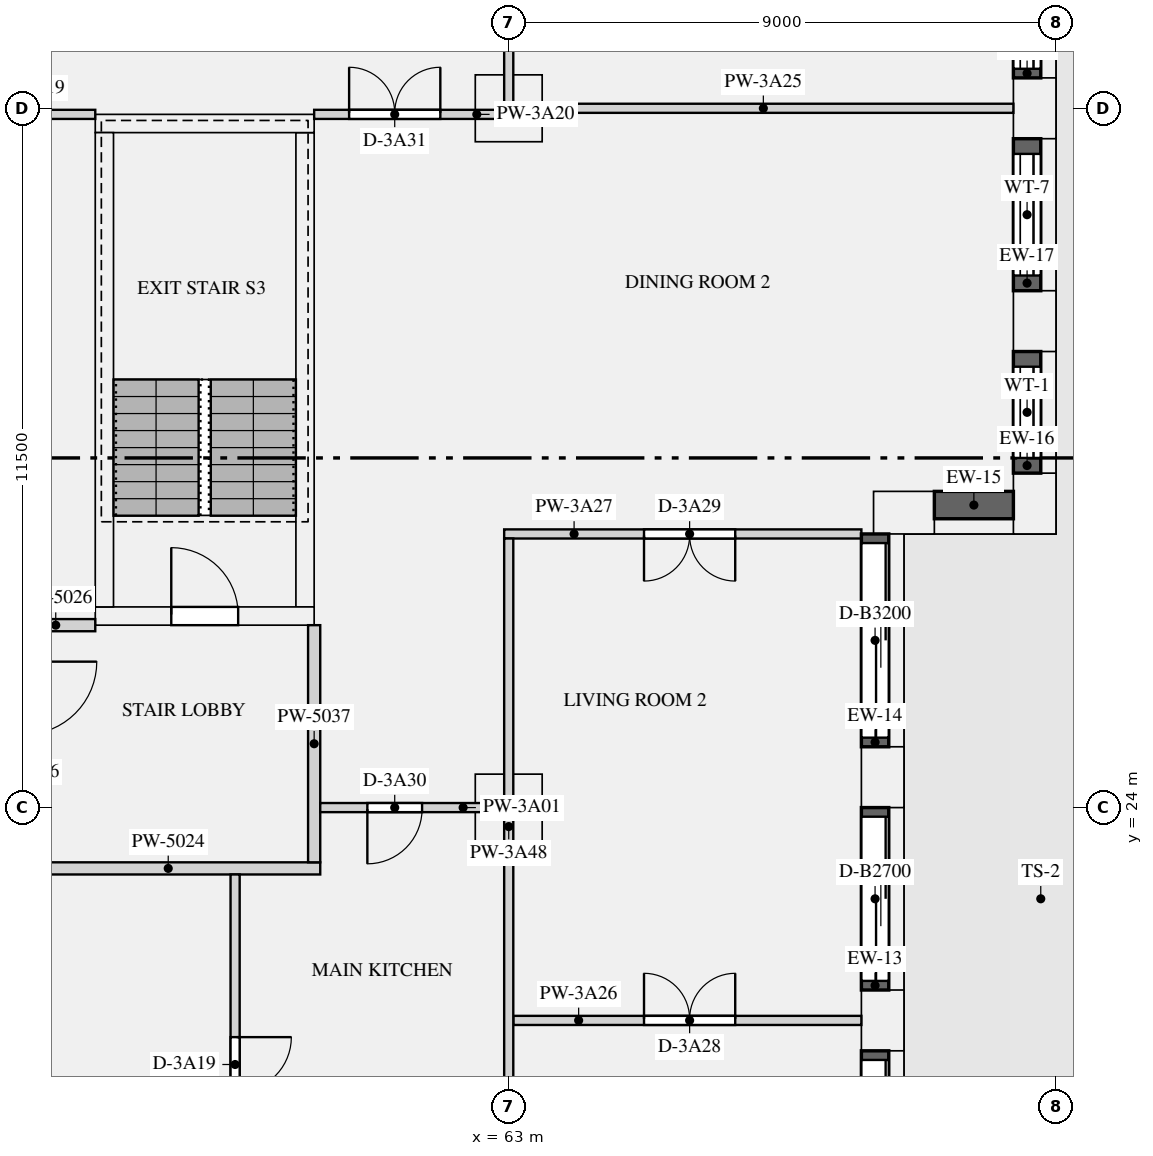
"""IFC4 building model, lengths in metres.
Left out: names, types, materials, properties, quantities, classifications, styles, units other than length and angle.
Written with IfcOpenShell. Run it as: python <this file> out.ifc"""

import sys

from ifc_helpers import new_model, si_unit, direction, frame, frame_2d, origin, origin_2d, place, context, subcontext, project, spatial, rectangle, extrude, element, fill, save


model = new_model("IFC4")
c1 = context("Model", 3, precision=1e-05, world=origin(), true_north=direction((0.0, 1.0)))
c2 = subcontext(c1, "Body", "Model", "MODEL_VIEW")
j1 = project(units=[si_unit("LENGTHUNIT", "METRE"), si_unit("PLANEANGLEUNIT", "RADIAN")], contexts=[c1])
p1 = place(None, origin())
s1 = spatial("IfcSite", under=j1, at=p1, CompositionType="ELEMENT")
p2 = place(p1, origin())
s2 = spatial("IfcBuilding", under=s1, at=p2, CompositionType="ELEMENT")
p3 = place(p2, frame((0.0, 0.0, 141.3)))
s3 = spatial("IfcBuildingStorey", under=s2, at=p3, CompositionType="ELEMENT", Elevation=141.3)
for number, where, z_axis, x_axis in (
    (1, (69.15, 20.5, 0.0), (0.0, 0.0, 1.0), (0.0, 1.0, 0.0)),
    (2, (69.15, 24.5, 0.0), (0.0, 0.0, 1.0), (0.0, 1.0, 0.0)),
    (3, (69.5, 28.85, 0.0), (0.0, 0.0, 1.0), (1.0, 0.0, 0.0)),
    (4, (71.65, 29.0, 0.0), (0.0, 0.0, 1.0), (0.0, 1.0, 0.0)),
    (5, (71.65, 32.0, 0.0), (0.0, 0.0, 1.0), (0.0, 1.0, 0.0)),
    (6, (71.65, 35.5, 0.0), (0.0, 0.0, 1.0), (0.0, 1.0, 0.0)),
):
    element("IfcColumn", number, at=place(p3, frame(where, z_axis=z_axis, x_axis=x_axis)), inside=s3, PredefinedType="USERDEFINED", context=c2, shape_type="SweptSolid", body=[
        extrude(rectangle(XDim=1.0, YDim=0.7, at=origin_2d()), origin(), (0.0, 0.0, 1.0), 3.15),
    ])
for number, where, z_axis, x_axis in (
    (7, (63.0, 24.0, 0.0), (0.0, 0.0, 1.0), (1.0, 0.0, 0.0)),
    (8, (63.0, 35.5, 0.0), (0.0, 0.0, 1.0), (1.0, 0.0, 0.0)),
):
    element("IfcColumn", number, at=place(p3, frame(where, z_axis=z_axis, x_axis=x_axis)), inside=s3, PredefinedType="COLUMN", context=c2, shape_type="SweptSolid", body=[
        extrude(rectangle(XDim=1.1, YDim=1.1, at=origin_2d()), origin(), (0.0, 0.0, 1.0), 3.15),
    ])
p4 = place(p3, frame((56.2, 27.15, 0.0), z_axis=(0.0, 0.0, 1.0), x_axis=(1.0, 0.0, 0.0)))
e9 = element("IfcWall", 9, at=p4, inside=s3, PredefinedType="SHEAR", context=c2, shape_type="SweptSolid", body=[
    extrude(rectangle(XDim=3.6, YDim=0.3, at=frame_2d((1.8, 0.0))), origin(), (0.0, 0.0, 1.0), 3.15),
])
p5 = place(p4, frame((1.25, 0.0, 0.0)))
e10 = element("IfcOpeningElement", 10, at=p5, cuts=e9, PredefinedType="OPENING", context=c2, shape_type="SweptSolid", body=[
    extrude(rectangle(XDim=1.1, YDim=2.1, at=frame_2d((0.55, 1.05))), frame((0.0, 0.16, 0.0), z_axis=(0.0, -1.0, 0.0), x_axis=(1.0, 0.0, 0.0)), (0.0, 0.0, 1.0), 0.32),
])
p6 = place(p3, frame((56.2, 35.25, 0.0), z_axis=(0.0, 0.0, 1.0), x_axis=(1.0, 0.0, 0.0)))
e11 = element("IfcWall", 11, at=p6, inside=s3, PredefinedType="SHEAR", context=c2, shape_type="SweptSolid", body=[
    extrude(rectangle(XDim=3.6, YDim=0.3, at=frame_2d((1.8, 0.0))), origin(), (0.0, 0.0, 1.0), 3.15),
])
for number, where, z_axis, x_axis in (
    (12, (56.35, 27.3, 0.0), (0.0, 0.0, 1.0), (0.0, 1.0, 0.0)),
    (13, (59.65, 27.3, 0.0), (0.0, 0.0, 1.0), (0.0, 1.0, 0.0)),
):
    element("IfcWall", number, at=place(p3, frame(where, z_axis=z_axis, x_axis=x_axis)), inside=s3, PredefinedType="SHEAR", context=c2, shape_type="SweptSolid", body=[
        extrude(rectangle(XDim=7.8, YDim=0.3, at=frame_2d((3.9, 0.0))), origin(), (0.0, 0.0, 1.0), 3.15),
    ])
p7 = place(p3, frame((69.025, 17.0, 0.0), z_axis=(0.0, 0.0, 1.0), x_axis=(0.0, 1.0, 0.0)))
e14 = element("IfcWall", 14, at=p7, inside=s3, PredefinedType="SOLIDWALL", context=c2, shape_type="SweptSolid", body=[
    extrude(rectangle(XDim=3.0, YDim=0.45, at=frame_2d((1.5, 0.0))), origin(), (0.0, 0.0, 1.0), 2.83),
])
p8 = place(p7, frame((0.15, 0.0, 0.0)))
e15 = element("IfcOpeningElement", 15, at=p8, cuts=e14, PredefinedType="OPENING", context=c2, shape_type="SweptSolid", body=[
    extrude(rectangle(XDim=2.7, YDim=2.3, at=frame_2d((1.35, 1.15))), frame((0.0, 0.235, 0.0), z_axis=(0.0, -1.0, 0.0), x_axis=(1.0, 0.0, 0.0)), (0.0, 0.0, 1.0), 0.47),
])
p9 = place(p3, frame((69.025, 21.0, 0.0), z_axis=(0.0, 0.0, 1.0), x_axis=(0.0, 1.0, 0.0)))
e16 = element("IfcWall", 16, at=p9, inside=s3, PredefinedType="SOLIDWALL", context=c2, shape_type="SweptSolid", body=[
    extrude(rectangle(XDim=3.0, YDim=0.45, at=frame_2d((1.5, 0.0))), origin(), (0.0, 0.0, 1.0), 2.83),
])
p10 = place(p9, frame((0.15, 0.0, 0.0)))
e17 = element("IfcOpeningElement", 17, at=p10, cuts=e16, PredefinedType="OPENING", context=c2, shape_type="SweptSolid", body=[
    extrude(rectangle(XDim=2.7, YDim=2.3, at=frame_2d((1.35, 1.15))), frame((0.0, 0.235, 0.0), z_axis=(0.0, -1.0, 0.0), x_axis=(1.0, 0.0, 0.0)), (0.0, 0.0, 1.0), 0.47),
])
p11 = place(p3, frame((69.025, 25.0, 0.0), z_axis=(0.0, 0.0, 1.0), x_axis=(0.0, 1.0, 0.0)))
e18 = element("IfcWall", 18, at=p11, inside=s3, PredefinedType="SOLIDWALL", context=c2, shape_type="SweptSolid", body=[
    extrude(rectangle(XDim=3.5, YDim=0.45, at=frame_2d((1.75, 0.0))), origin(), (0.0, 0.0, 1.0), 2.83),
])
p12 = place(p11, frame((0.15, 0.0, 0.0)))
e19 = element("IfcOpeningElement", 19, at=p12, cuts=e18, PredefinedType="OPENING", context=c2, shape_type="SweptSolid", body=[
    extrude(rectangle(XDim=3.2, YDim=2.3, at=frame_2d((1.6, 1.15))), frame((0.0, 0.235, 0.0), z_axis=(0.0, -1.0, 0.0), x_axis=(1.0, 0.0, 0.0)), (0.0, 0.0, 1.0), 0.47),
])
p13 = place(p3, frame((70.0, 28.975, 0.9), z_axis=(0.0, 0.0, 1.0), x_axis=(1.0, 0.0, 0.0)))
e20 = element("IfcWall", 20, at=p13, inside=s3, PredefinedType="SOLIDWALL", context=c2, shape_type="SweptSolid", body=[
    extrude(rectangle(XDim=1.3, YDim=0.45, at=frame_2d((0.65, 0.0))), origin(), (0.0, 0.0, 1.0), 1.93),
])
p14 = place(p3, frame((71.525, 29.5, 0.9), z_axis=(0.0, 0.0, 1.0), x_axis=(0.0, 1.0, 0.0)))
e21 = element("IfcWall", 21, at=p14, inside=s3, PredefinedType="SOLIDWALL", context=c2, shape_type="SweptSolid", body=[
    extrude(rectangle(XDim=2.0, YDim=0.45, at=frame_2d((1.0, 0.0))), origin(), (0.0, 0.0, 1.0), 1.93),
])
p15 = place(p14, frame((0.25, 0.0, 0.15)))
e22 = element("IfcOpeningElement", 22, at=p15, cuts=e21, PredefinedType="OPENING", context=c2, shape_type="SweptSolid", body=[
    extrude(rectangle(XDim=1.5, YDim=1.5, at=frame_2d((0.75, 0.75))), frame((0.0, 0.235, 0.0), z_axis=(0.0, -1.0, 0.0), x_axis=(1.0, 0.0, 0.0)), (0.0, 0.0, 1.0), 0.47),
])
p16 = place(p3, frame((71.525, 32.5, 0.9), z_axis=(0.0, 0.0, 1.0), x_axis=(0.0, 1.0, 0.0)))
e23 = element("IfcWall", 23, at=p16, inside=s3, PredefinedType="SOLIDWALL", context=c2, shape_type="SweptSolid", body=[
    extrude(rectangle(XDim=2.5, YDim=0.45, at=frame_2d((1.25, 0.0))), origin(), (0.0, 0.0, 1.0), 1.93),
])
p17 = place(p16, frame((0.25, 0.0, 0.15)))
e24 = element("IfcOpeningElement", 24, at=p17, cuts=e23, PredefinedType="OPENING", context=c2, shape_type="SweptSolid", body=[
    extrude(rectangle(XDim=2.0, YDim=1.5, at=frame_2d((1.0, 0.75))), frame((0.0, 0.235, 0.0), z_axis=(0.0, -1.0, 0.0), x_axis=(1.0, 0.0, 0.0)), (0.0, 0.0, 1.0), 0.47),
])
p18 = place(p3, frame((71.525, 36.0, 0.9), z_axis=(0.0, 0.0, 1.0), x_axis=(0.0, 1.0, 0.0)))
e25 = element("IfcWall", 25, at=p18, inside=s3, PredefinedType="SOLIDWALL", context=c2, shape_type="SweptSolid", body=[
    extrude(rectangle(XDim=2.3, YDim=0.45, at=frame_2d((1.15, 0.0))), origin(), (0.0, 0.0, 1.0), 1.93),
])
p19 = place(p18, frame((0.15, 0.0, 0.15)))
e26 = element("IfcOpeningElement", 26, at=p19, cuts=e25, PredefinedType="OPENING", context=c2, shape_type="SweptSolid", body=[
    extrude(rectangle(XDim=2.0, YDim=1.5, at=frame_2d((1.0, 0.75))), frame((0.0, 0.235, 0.0), z_axis=(0.0, -1.0, 0.0), x_axis=(1.0, 0.0, 0.0)), (0.0, 0.0, 1.0), 0.47),
])
p20 = place(p3, frame((54.9, 23.0, 0.0), z_axis=(0.0, 0.0, 1.0), x_axis=(1.0, 0.0, 0.0)))
e27 = element("IfcWall", 27, at=p20, inside=s3, PredefinedType="PARTITIONING", context=c2, shape_type="SweptSolid", body=[
    extrude(rectangle(XDim=5.0, YDim=0.2, at=frame_2d((2.5, 0.0))), origin(), (0.0, 0.0, 1.0), 2.83),
])
p21 = place(p3, frame((54.9, 27.0, 0.0), z_axis=(0.0, 0.0, 1.0), x_axis=(1.0, 0.0, 0.0)))
e28 = element("IfcWall", 28, at=p21, inside=s3, PredefinedType="PARTITIONING", context=c2, shape_type="SweptSolid", body=[
    extrude(rectangle(XDim=1.3, YDim=0.2, at=frame_2d((0.65, 0.0))), origin(), (0.0, 0.0, 1.0), 2.83),
])
p22 = place(p3, frame((59.8, 23.1, 0.0), z_axis=(0.0, 0.0, 1.0), x_axis=(0.0, 1.0, 0.0)))
e29 = element("IfcWall", 29, at=p22, inside=s3, PredefinedType="PARTITIONING", context=c2, shape_type="SweptSolid", body=[
    extrude(rectangle(XDim=3.9, YDim=0.2, at=frame_2d((1.95, 0.0))), origin(), (0.0, 0.0, 1.0), 2.83),
])
p23 = place(p3, frame((59.9, 24.0, 0.0), z_axis=(0.0, 0.0, 1.0), x_axis=(1.0, 0.0, 0.0)))
e30 = element("IfcWall", 30, at=p23, inside=s3, PredefinedType="PARTITIONING", context=c2, shape_type="SweptSolid", body=[
    extrude(rectangle(XDim=3.025, YDim=0.15, at=frame_2d((1.513, 0.0))), origin(), (0.0, 0.0, 1.0), 2.83),
])
p24 = place(p23, frame((0.775, 0.0, 0.0)))
e31 = element("IfcOpeningElement", 31, at=p24, cuts=e30, PredefinedType="OPENING", context=c2, shape_type="SweptSolid", body=[
    extrude(rectangle(XDim=0.9, YDim=2.1, at=frame_2d((0.45, 1.05))), frame((0.0, 0.085, 0.0), z_axis=(0.0, -1.0, 0.0), x_axis=(1.0, 0.0, 0.0)), (0.0, 0.0, 1.0), 0.17),
])
p25 = place(p3, frame((53.925, 35.4, 0.0), z_axis=(0.0, 0.0, 1.0), x_axis=(1.0, 0.0, 0.0)))
e32 = element("IfcWall", 32, at=p25, inside=s3, PredefinedType="PARTITIONING", context=c2, shape_type="SweptSolid", body=[
    extrude(rectangle(XDim=2.275, YDim=0.15, at=frame_2d((1.137, 0.0))), origin(), (0.0, 0.0, 1.0), 2.83),
])
p26 = place(p3, frame((59.8, 35.4, 0.0), z_axis=(0.0, 0.0, 1.0), x_axis=(1.0, 0.0, 0.0)))
e33 = element("IfcWall", 33, at=p26, inside=s3, PredefinedType="PARTITIONING", context=c2, shape_type="SweptSolid", body=[
    extrude(rectangle(XDim=3.275, YDim=0.15, at=frame_2d((1.637, 0.0))), origin(), (0.0, 0.0, 1.0), 2.83),
])
p27 = place(p26, frame((0.575, 0.0, 0.0)))
e34 = element("IfcOpeningElement", 34, at=p27, cuts=e33, PredefinedType="OPENING", context=c2, shape_type="SweptSolid", body=[
    extrude(rectangle(XDim=1.5, YDim=2.1, at=frame_2d((0.75, 1.05))), frame((0.0, 0.085, 0.0), z_axis=(0.0, -1.0, 0.0), x_axis=(1.0, 0.0, 0.0)), (0.0, 0.0, 1.0), 0.17),
])
p28 = place(p3, frame((63.075, 35.5, 0.0), z_axis=(0.0, 0.0, 1.0), x_axis=(1.0, 0.0, 0.0)))
e35 = element("IfcWall", 35, at=p28, inside=s3, PredefinedType="PARTITIONING", context=c2, shape_type="SweptSolid", body=[
    extrude(rectangle(XDim=8.225, YDim=0.15, at=frame_2d((4.113, 0.0))), origin(), (0.0, 0.0, 1.0), 2.83),
])
p29 = place(p3, frame((63.075, 20.5, 0.0), z_axis=(0.0, 0.0, 1.0), x_axis=(1.0, 0.0, 0.0)))
e36 = element("IfcWall", 36, at=p29, inside=s3, PredefinedType="PARTITIONING", context=c2, shape_type="SweptSolid", body=[
    extrude(rectangle(XDim=5.725, YDim=0.15, at=frame_2d((2.863, 0.0))), origin(), (0.0, 0.0, 1.0), 2.83),
])
p30 = place(p29, frame((2.15, 0.0, 0.0)))
e37 = element("IfcOpeningElement", 37, at=p30, cuts=e36, PredefinedType="OPENING", context=c2, shape_type="SweptSolid", body=[
    extrude(rectangle(XDim=1.5, YDim=2.1, at=frame_2d((0.75, 1.05))), frame((0.0, 0.085, 0.0), z_axis=(0.0, -1.0, 0.0), x_axis=(1.0, 0.0, 0.0)), (0.0, 0.0, 1.0), 0.17),
])
p31 = place(p3, frame((62.925, 28.5, 0.0), z_axis=(0.0, 0.0, 1.0), x_axis=(1.0, 0.0, 0.0)))
e38 = element("IfcWall", 38, at=p31, inside=s3, PredefinedType="PARTITIONING", context=c2, shape_type="SweptSolid", body=[
    extrude(rectangle(XDim=5.875, YDim=0.15, at=frame_2d((2.938, 0.0))), origin(), (0.0, 0.0, 1.0), 2.83),
])
p32 = place(p31, frame((2.3, 0.0, 0.0)))
e39 = element("IfcOpeningElement", 39, at=p32, cuts=e38, PredefinedType="OPENING", context=c2, shape_type="SweptSolid", body=[
    extrude(rectangle(XDim=1.5, YDim=2.1, at=frame_2d((0.75, 1.05))), frame((0.0, 0.085, 0.0), z_axis=(0.0, -1.0, 0.0), x_axis=(1.0, 0.0, 0.0)), (0.0, 0.0, 1.0), 0.17),
])
p33 = place(p3, frame((58.5, 12.575, 0.0), z_axis=(0.0, 0.0, 1.0), x_axis=(0.0, 1.0, 0.0)))
e40 = element("IfcWall", 40, at=p33, inside=s3, PredefinedType="PARTITIONING", context=c2, shape_type="SweptSolid", body=[
    extrude(rectangle(XDim=10.325, YDim=0.15, at=frame_2d((5.163, 0.0))), origin(), (0.0, 0.0, 1.0), 2.83),
])
p34 = place(p33, frame((6.75, 0.0, 0.0)))
e41 = element("IfcOpeningElement", 41, at=p34, cuts=e40, PredefinedType="OPENING", context=c2, shape_type="SweptSolid", body=[
    extrude(rectangle(XDim=0.9, YDim=2.1, at=frame_2d((0.45, 1.05))), frame((0.0, 0.085, 0.0), z_axis=(0.0, -1.0, 0.0), x_axis=(1.0, 0.0, 0.0)), (0.0, 0.0, 1.0), 0.17),
])
p35 = place(p3, frame((63.0, 12.575, 0.0), z_axis=(0.0, 0.0, 1.0), x_axis=(0.0, 1.0, 0.0)))
e42 = element("IfcWall", 42, at=p35, inside=s3, PredefinedType="PARTITIONING", context=c2, shape_type="SweptSolid", body=[
    extrude(rectangle(XDim=15.85, YDim=0.15, at=frame_2d((7.925, 0.0))), origin(), (0.0, 0.0, 1.0), 2.83),
])
p36 = place(p35, frame((5.475, 0.0, 0.0)))
e43 = element("IfcOpeningElement", 43, at=p36, cuts=e42, PredefinedType="OPENING", context=c2, shape_type="SweptSolid", body=[
    extrude(rectangle(XDim=0.9, YDim=2.1, at=frame_2d((0.45, 1.05))), frame((0.0, 0.085, 0.0), z_axis=(0.0, -1.0, 0.0), x_axis=(1.0, 0.0, 0.0)), (0.0, 0.0, 1.0), 0.17),
])
p37 = place(p3, frame((63.0, 35.475, 0.0), z_axis=(0.0, 0.0, 1.0), x_axis=(0.0, 1.0, 0.0)))
e44 = element("IfcWall", 44, at=p37, inside=s3, PredefinedType="PARTITIONING", context=c2, shape_type="SweptSolid", body=[
    extrude(rectangle(XDim=7.325, YDim=0.15, at=frame_2d((3.663, 0.0))), origin(), (0.0, 0.0, 1.0), 2.83),
])
p38 = place(p37, frame((3.275, 0.0, 0.0)))
e45 = element("IfcOpeningElement", 45, at=p38, cuts=e44, PredefinedType="OPENING", context=c2, shape_type="SweptSolid", body=[
    extrude(rectangle(XDim=1.5, YDim=2.1, at=frame_2d((0.75, 1.05))), frame((0.0, 0.085, 0.0), z_axis=(0.0, -1.0, 0.0), x_axis=(1.0, 0.0, 0.0)), (0.0, 0.0, 1.0), 0.17),
])
p39 = place(p8, origin())
e46 = element("IfcDoor", 46, at=p39, inside=s3, OperationType="SLIDING_TO_LEFT", PredefinedType="DOOR", context=c2, shape_type="SweptSolid", body=[
    extrude(rectangle(XDim=2.7, YDim=2.3, at=frame_2d((1.35, 1.15))), frame((0.0, -0.07, 0.0), z_axis=(0.0, -1.0, 0.0), x_axis=(1.0, 0.0, 0.0)), (0.0, 0.0, 1.0), 0.05),
])
fill(e15, e46)
p40 = place(p10, origin())
e47 = element("IfcDoor", 47, at=p40, inside=s3, OperationType="SLIDING_TO_LEFT", PredefinedType="DOOR", context=c2, shape_type="SweptSolid", body=[
    extrude(rectangle(XDim=2.7, YDim=2.3, at=frame_2d((1.35, 1.15))), frame((0.0, -0.07, 0.0), z_axis=(0.0, -1.0, 0.0), x_axis=(1.0, 0.0, 0.0)), (0.0, 0.0, 1.0), 0.05),
])
fill(e17, e47)
p41 = place(p12, origin())
e48 = element("IfcDoor", 48, at=p41, inside=s3, OperationType="SLIDING_TO_LEFT", PredefinedType="DOOR", context=c2, shape_type="SweptSolid", body=[
    extrude(rectangle(XDim=3.2, YDim=2.3, at=frame_2d((1.6, 1.15))), frame((0.0, -0.07, 0.0), z_axis=(0.0, -1.0, 0.0), x_axis=(1.0, 0.0, 0.0)), (0.0, 0.0, 1.0), 0.05),
])
fill(e19, e48)
p42 = place(p15, origin())
e49 = element("IfcWindow", 49, at=p42, inside=s3, PartitioningType="SINGLE_PANEL", PredefinedType="WINDOW", context=c2, shape_type="SweptSolid", body=[
    extrude(rectangle(XDim=1.5, YDim=1.5, at=frame_2d((0.75, 0.75))), frame((0.0, -0.065, 0.0), z_axis=(0.0, -1.0, 0.0), x_axis=(1.0, 0.0, 0.0)), (0.0, 0.0, 1.0), 0.06),
])
fill(e22, e49)
p43 = place(p17, origin())
e50 = element("IfcWindow", 50, at=p43, inside=s3, PartitioningType="SINGLE_PANEL", PredefinedType="WINDOW", context=c2, shape_type="SweptSolid", body=[
    extrude(rectangle(XDim=2.0, YDim=1.5, at=frame_2d((1.0, 0.75))), frame((0.0, -0.065, 0.0), z_axis=(0.0, -1.0, 0.0), x_axis=(1.0, 0.0, 0.0)), (0.0, 0.0, 1.0), 0.06),
])
fill(e24, e50)
p44 = place(p19, origin())
e51 = element("IfcWindow", 51, at=p44, inside=s3, PartitioningType="SINGLE_PANEL", PredefinedType="WINDOW", context=c2, shape_type="SweptSolid", body=[
    extrude(rectangle(XDim=2.0, YDim=1.5, at=frame_2d((1.0, 0.75))), frame((0.0, -0.065, 0.0), z_axis=(0.0, -1.0, 0.0), x_axis=(1.0, 0.0, 0.0)), (0.0, 0.0, 1.0), 0.06),
])
fill(e26, e51)
p45 = place(p5, origin())
e52 = element("IfcDoor", 52, at=p45, inside=s3, OperationType="SINGLE_SWING_LEFT", PredefinedType="DOOR", context=c2, shape_type="SweptSolid", body=[
    extrude(rectangle(XDim=1.1, YDim=2.1, at=frame_2d((0.55, 1.05))), frame((0.0, 0.025, 0.0), z_axis=(0.0, -1.0, 0.0), x_axis=(1.0, 0.0, 0.0)), (0.0, 0.0, 1.0), 0.05),
])
fill(e10, e52)
p46 = place(p34, frame((0.9, 0.0, 0.0), z_axis=(0.0, 0.0, 1.0), x_axis=(-1.0, 0.0, 0.0)))
e53 = element("IfcDoor", 53, at=p46, inside=s3, OperationType="SINGLE_SWING_LEFT", PredefinedType="DOOR", context=c2, shape_type="SweptSolid", body=[
    extrude(rectangle(XDim=0.9, YDim=2.1, at=frame_2d((0.45, 1.05))), frame((0.0, 0.025, 0.0), z_axis=(0.0, -1.0, 0.0), x_axis=(1.0, 0.0, 0.0)), (0.0, 0.0, 1.0), 0.05),
])
fill(e41, e53)
p47 = place(p30, origin())
e54 = element("IfcDoor", 54, at=p47, inside=s3, OperationType="DOUBLE_DOOR_SINGLE_SWING", PredefinedType="DOOR", context=c2, shape_type="SweptSolid", body=[
    extrude(rectangle(XDim=1.5, YDim=2.1, at=frame_2d((0.75, 1.05))), frame((0.0, 0.025, 0.0), z_axis=(0.0, -1.0, 0.0), x_axis=(1.0, 0.0, 0.0)), (0.0, 0.0, 1.0), 0.05),
])
fill(e37, e54)
p48 = place(p32, frame((1.5, 0.0, 0.0), z_axis=(0.0, 0.0, 1.0), x_axis=(-1.0, 0.0, 0.0)))
e55 = element("IfcDoor", 55, at=p48, inside=s3, OperationType="DOUBLE_DOOR_SINGLE_SWING", PredefinedType="DOOR", context=c2, shape_type="SweptSolid", body=[
    extrude(rectangle(XDim=1.5, YDim=2.1, at=frame_2d((0.75, 1.05))), frame((0.0, 0.025, 0.0), z_axis=(0.0, -1.0, 0.0), x_axis=(1.0, 0.0, 0.0)), (0.0, 0.0, 1.0), 0.05),
])
fill(e39, e55)
p49 = place(p24, frame((0.9, 0.0, 0.0), z_axis=(0.0, 0.0, 1.0), x_axis=(-1.0, 0.0, 0.0)))
e56 = element("IfcDoor", 56, at=p49, inside=s3, OperationType="SINGLE_SWING_RIGHT", PredefinedType="DOOR", context=c2, shape_type="SweptSolid", body=[
    extrude(rectangle(XDim=0.9, YDim=2.1, at=frame_2d((0.45, 1.05))), frame((0.0, 0.025, 0.0), z_axis=(0.0, -1.0, 0.0), x_axis=(1.0, 0.0, 0.0)), (0.0, 0.0, 1.0), 0.05),
])
fill(e31, e56)
p50 = place(p27, origin())
e57 = element("IfcDoor", 57, at=p50, inside=s3, OperationType="DOUBLE_DOOR_SINGLE_SWING", PredefinedType="DOOR", context=c2, shape_type="SweptSolid", body=[
    extrude(rectangle(XDim=1.5, YDim=2.1, at=frame_2d((0.75, 1.05))), frame((0.0, 0.025, 0.0), z_axis=(0.0, -1.0, 0.0), x_axis=(1.0, 0.0, 0.0)), (0.0, 0.0, 1.0), 0.05),
])
fill(e34, e57)
save(model, sys.argv[1])
